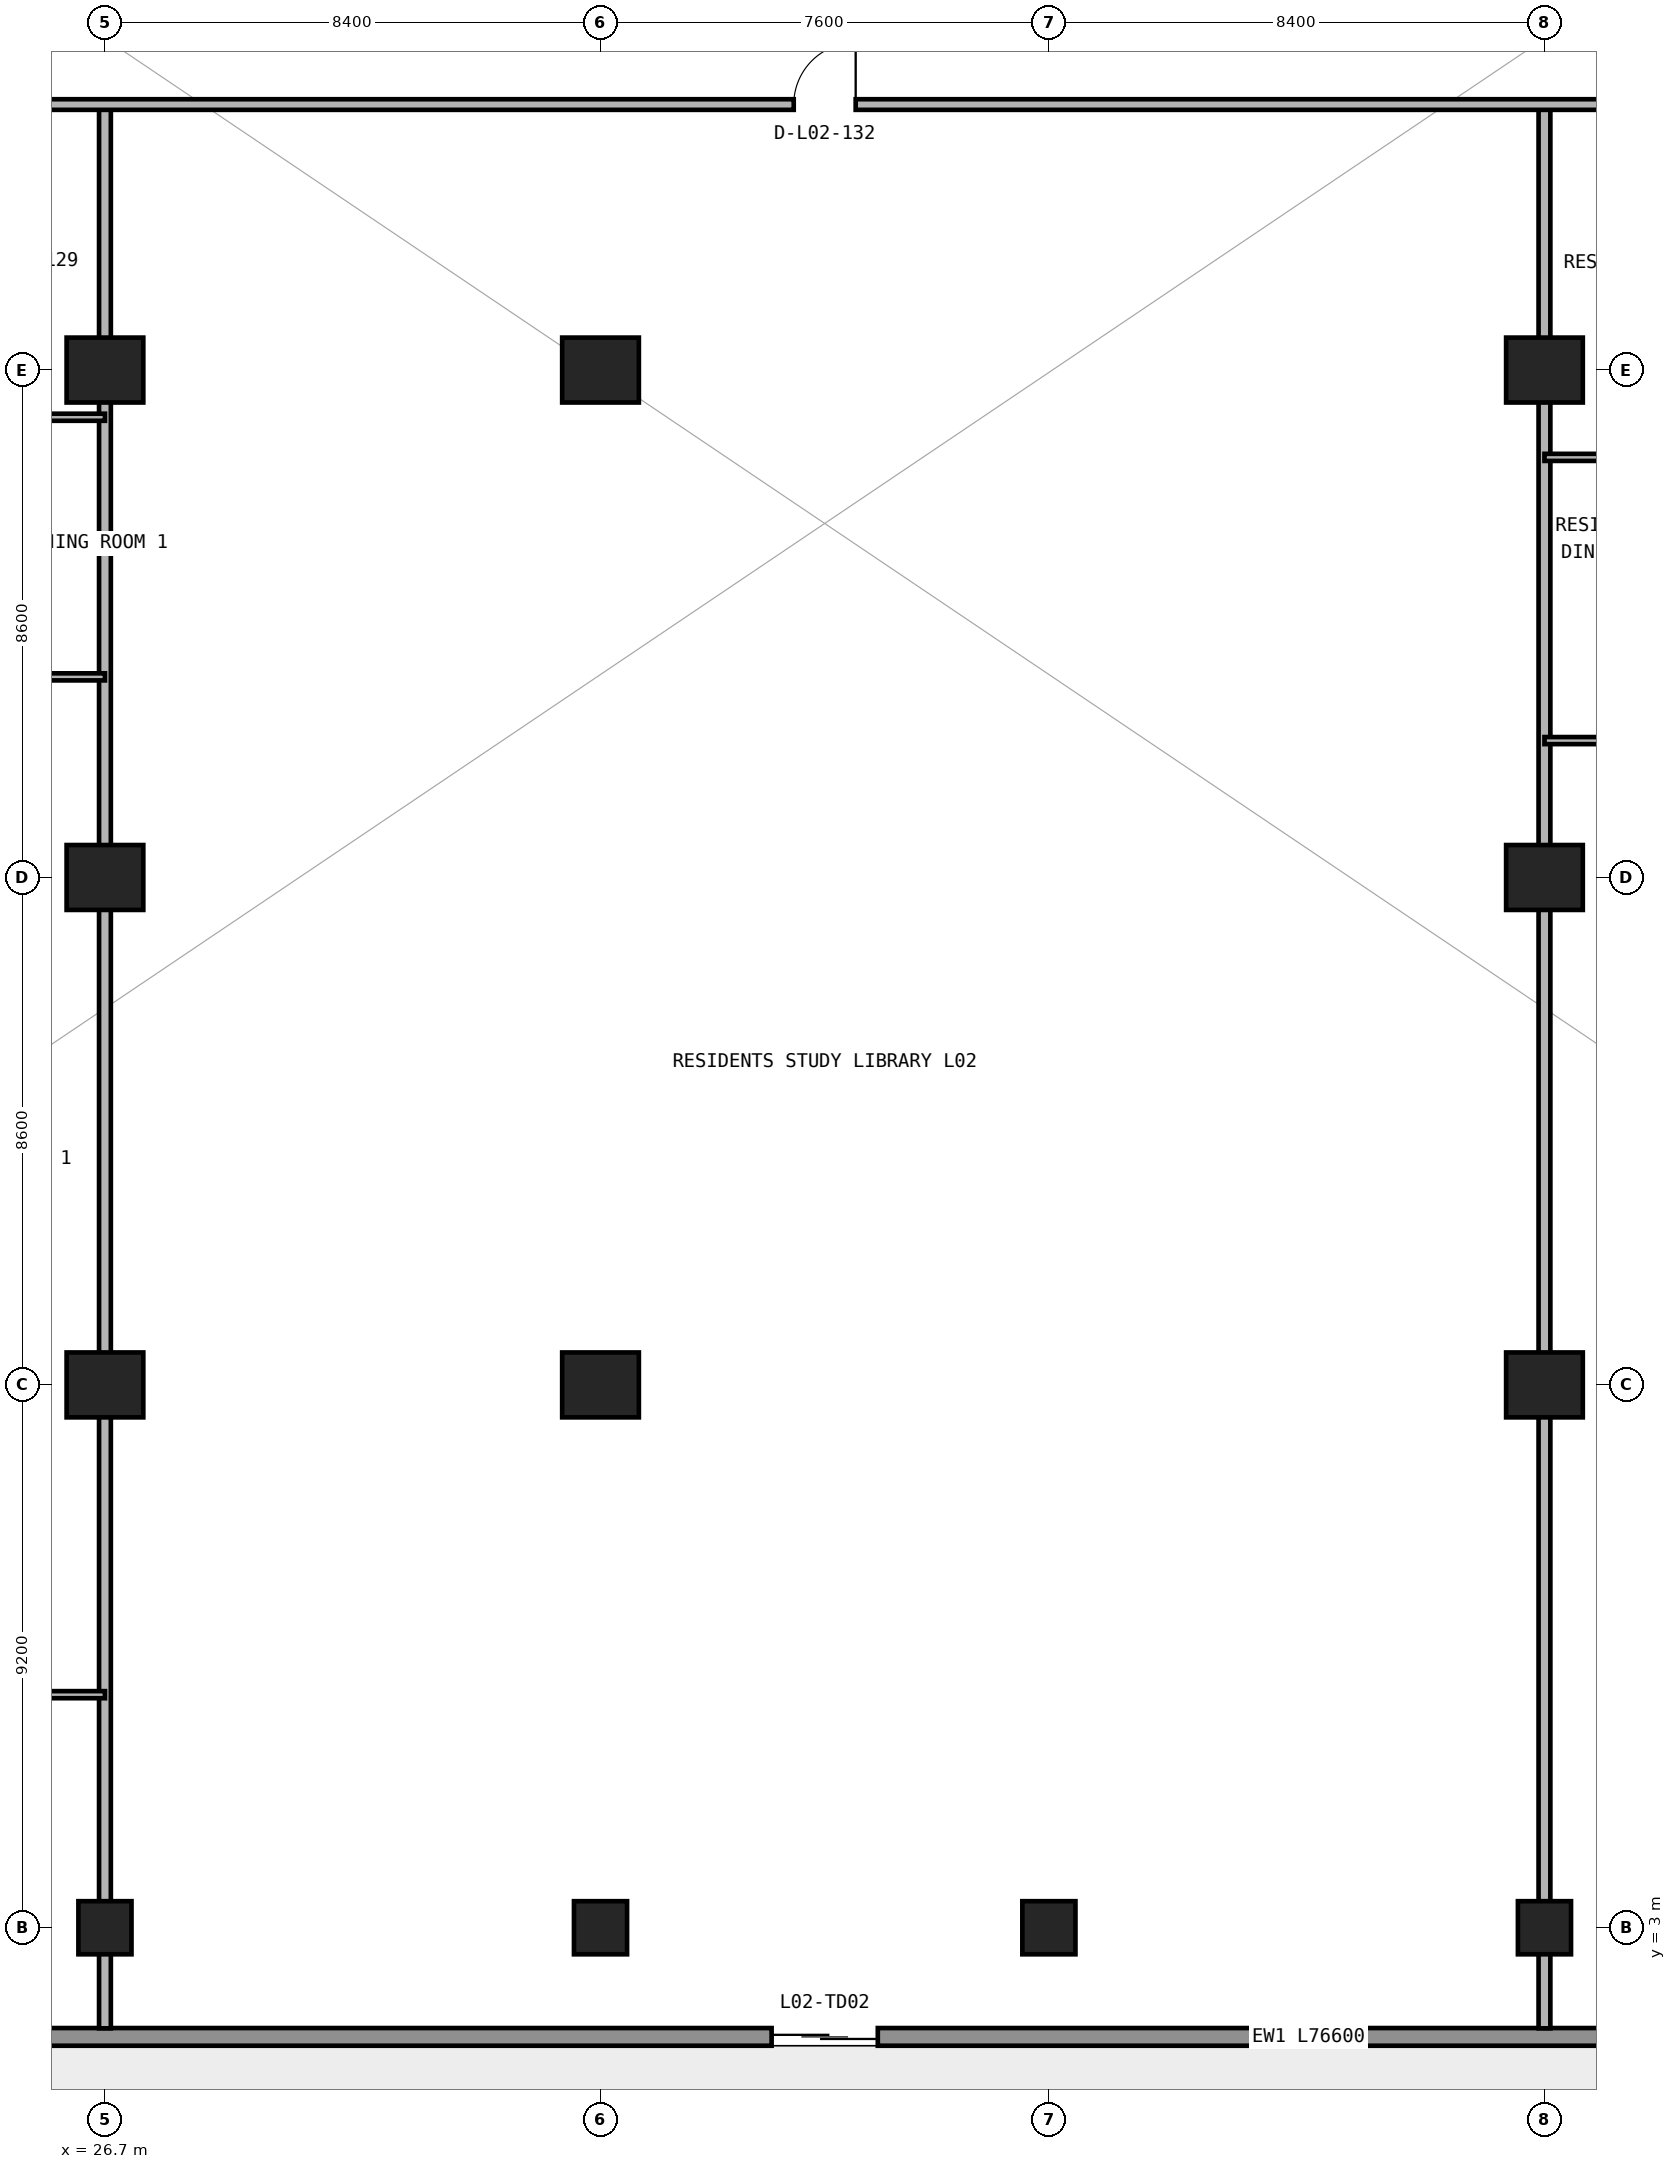
"""IFC4 building model, lengths in metres.
Left out: names, types, materials, properties, quantities, classifications, styles, units other than length and angle.
Written with IfcOpenShell. Run it as: python <this file> out.ifc"""

import sys

from ifc_helpers import new_model, si_unit, direction, frame, frame_2d, origin, origin_2d, place, context, subcontext, project, spatial, rectangle, circle, extrude, element, fill, save


model = new_model("IFC4")
c1 = context("Model", 3, precision=1e-05, world=origin(), true_north=direction((0.0, 1.0)))
c2 = subcontext(c1, "Body", "Model", "MODEL_VIEW")
j1 = project(units=[si_unit("LENGTHUNIT", "METRE"), si_unit("PLANEANGLEUNIT", "RADIAN")], contexts=[c1])
p1 = place(None, origin())
s1 = spatial("IfcSite", under=j1, at=p1, CompositionType="ELEMENT")
p2 = place(p1, origin())
s2 = spatial("IfcBuilding", under=s1, at=p2, CompositionType="ELEMENT")
p3 = place(p2, frame((0.0, 0.0, 10.2)))
s3 = spatial("IfcBuildingStorey", under=s2, at=p3, CompositionType="ELEMENT", Elevation=10.2)
for number, where, z_axis, x_axis in (
    (1, (26.7, 3.0, 0.0), (0.0, 0.0, 1.0), (1.0, 0.0, 0.0)),
    (2, (35.1, 3.0, 0.0), (0.0, 0.0, 1.0), (1.0, 0.0, 0.0)),
    (3, (42.7, 3.0, 0.0), (0.0, 0.0, 1.0), (1.0, 0.0, 0.0)),
    (4, (51.1, 3.0, 0.0), (0.0, 0.0, 1.0), (1.0, 0.0, 0.0)),
):
    element("IfcColumn", number, at=place(p3, frame(where, z_axis=z_axis, x_axis=x_axis)), inside=s3, PredefinedType="COLUMN", context=c2, shape_type="SweptSolid", body=[
        extrude(circle(Radius=0.45, at=origin_2d()), origin(), (0.0, 0.0, 1.0), 4.5),
    ])
for number, where, z_axis, x_axis in (
    (5, (26.7, 12.2, 0.0), (0.0, 0.0, 1.0), (1.0, 0.0, 0.0)),
    (6, (35.1, 12.2, 0.0), (0.0, 0.0, 1.0), (1.0, 0.0, 0.0)),
    (7, (51.1, 12.2, 0.0), (0.0, 0.0, 1.0), (1.0, 0.0, 0.0)),
    (8, (26.7, 20.8, 0.0), (0.0, 0.0, 1.0), (1.0, 0.0, 0.0)),
    (9, (51.1, 20.8, 0.0), (0.0, 0.0, 1.0), (1.0, 0.0, 0.0)),
    (10, (26.7, 29.4, 0.0), (0.0, 0.0, 1.0), (1.0, 0.0, 0.0)),
    (11, (35.1, 29.4, 0.0), (0.0, 0.0, 1.0), (1.0, 0.0, 0.0)),
    (12, (51.1, 29.4, 0.0), (0.0, 0.0, 1.0), (1.0, 0.0, 0.0)),
):
    element("IfcColumn", number, at=place(p3, frame(where, z_axis=z_axis, x_axis=x_axis)), inside=s3, PredefinedType="COLUMN", context=c2, shape_type="SweptSolid", body=[
        extrude(rectangle(XDim=1.3, YDim=1.1, at=origin_2d()), origin(), (0.0, 0.0, 1.0), 4.5),
    ])
p4 = place(p3, frame((77.2, 1.15, 0.0), z_axis=(0.0, 0.0, 1.0), x_axis=(-1.0, 0.0, 0.0)))
e13 = element("IfcWall", 13, at=p4, inside=s3, PredefinedType="STANDARD", context=c2, shape_type="SweptSolid", body=[
    extrude(rectangle(XDim=76.6, YDim=0.3, at=frame_2d((38.3, 0.0))), origin(), (0.0, 0.0, 1.0), 4.5),
])
p5 = place(p4, frame((70.375, 0.0, 0.85)))
e14 = element("IfcOpeningElement", 14, at=p5, cuts=e13, PredefinedType="OPENING", context=c2, shape_type="SweptSolid", body=[
    extrude(rectangle(XDim=3.0, YDim=2.4, at=frame_2d((1.5, 1.2))), frame((0.0, 0.16, 0.0), z_axis=(0.0, -1.0, 0.0), x_axis=(1.0, 0.0, 0.0)), (0.0, 0.0, 1.0), 0.32),
])
p6 = place(p4, frame((62.2, 0.0, 0.0)))
e15 = element("IfcOpeningElement", 15, at=p6, cuts=e13, PredefinedType="OPENING", context=c2, shape_type="SweptSolid", body=[
    extrude(rectangle(XDim=1.8, YDim=2.3, at=frame_2d((0.9, 1.15))), frame((0.0, 0.16, 0.0), z_axis=(0.0, -1.0, 0.0), x_axis=(1.0, 0.0, 0.0)), (0.0, 0.0, 1.0), 0.32),
])
p7 = place(p4, frame((53.6, 0.0, 0.85)))
e16 = element("IfcOpeningElement", 16, at=p7, cuts=e13, PredefinedType="OPENING", context=c2, shape_type="SweptSolid", body=[
    extrude(rectangle(XDim=2.2, YDim=1.55, at=frame_2d((1.1, 0.775))), frame((0.0, 0.16, 0.0), z_axis=(0.0, -1.0, 0.0), x_axis=(1.0, 0.0, 0.0)), (0.0, 0.0, 1.0), 0.32),
])
p8 = place(p4, frame((37.4, 0.0, 0.0)))
e17 = element("IfcOpeningElement", 17, at=p8, cuts=e13, PredefinedType="OPENING", context=c2, shape_type="SweptSolid", body=[
    extrude(rectangle(XDim=1.8, YDim=2.3, at=frame_2d((0.9, 1.15))), frame((0.0, 0.16, 0.0), z_axis=(0.0, -1.0, 0.0), x_axis=(1.0, 0.0, 0.0)), (0.0, 0.0, 1.0), 0.32),
])
p9 = place(p4, frame((21.0, 0.0, 0.0)))
e18 = element("IfcOpeningElement", 18, at=p9, cuts=e13, PredefinedType="OPENING", context=c2, shape_type="SweptSolid", body=[
    extrude(rectangle(XDim=1.8, YDim=2.3, at=frame_2d((0.9, 1.15))), frame((0.0, 0.16, 0.0), z_axis=(0.0, -1.0, 0.0), x_axis=(1.0, 0.0, 0.0)), (0.0, 0.0, 1.0), 0.32),
])
p10 = place(p4, frame((12.4, 0.0, 0.85)))
e19 = element("IfcOpeningElement", 19, at=p10, cuts=e13, PredefinedType="OPENING", context=c2, shape_type="SweptSolid", body=[
    extrude(rectangle(XDim=2.2, YDim=1.55, at=frame_2d((1.1, 0.775))), frame((0.0, 0.16, 0.0), z_axis=(0.0, -1.0, 0.0), x_axis=(1.0, 0.0, 0.0)), (0.0, 0.0, 1.0), 0.32),
])
p11 = place(p4, frame((3.825, 0.0, 0.0)))
e20 = element("IfcOpeningElement", 20, at=p11, cuts=e13, PredefinedType="OPENING", context=c2, shape_type="SweptSolid", body=[
    extrude(rectangle(XDim=1.8, YDim=2.3, at=frame_2d((0.9, 1.15))), frame((0.0, 0.16, 0.0), z_axis=(0.0, -1.0, 0.0), x_axis=(1.0, 0.0, 0.0)), (0.0, 0.0, 1.0), 0.32),
])
for number, where, z_axis, x_axis in (
    (21, (26.7, 1.295, 0.0), (0.0, 0.0, 1.0), (0.0, 1.0, 0.0)),
    (22, (51.1, 1.295, 0.0), (0.0, 0.0, 1.0), (0.0, 1.0, 0.0)),
):
    element("IfcWall", number, at=place(p3, frame(where, z_axis=z_axis, x_axis=x_axis)), inside=s3, PredefinedType="PARTITIONING", context=c2, shape_type="SweptSolid", body=[
        extrude(rectangle(XDim=32.605, YDim=0.2, at=frame_2d((16.302, 0.0))), origin(), (0.0, 0.0, 1.0), 3.464),
    ])
p12 = place(p3, frame((18.3, 6.95, 0.0), z_axis=(0.0, 0.0, 1.0), x_axis=(1.0, 0.0, 0.0)))
e23 = element("IfcWall", 23, at=p12, inside=s3, PredefinedType="PARTITIONING", context=c2, shape_type="SweptSolid", body=[
    extrude(rectangle(XDim=8.4, YDim=0.12, at=frame_2d((4.2, 0.0))), origin(), (0.0, 0.0, 1.0), 4.5),
])
p13 = place(p12, frame((3.75, 0.0, 0.0)))
e24 = element("IfcOpeningElement", 24, at=p13, cuts=e23, PredefinedType="OPENING", context=c2, shape_type="SweptSolid", body=[
    extrude(rectangle(XDim=0.9, YDim=2.15, at=frame_2d((0.45, 1.075))), frame((0.0, 0.07, 0.0), z_axis=(0.0, -1.0, 0.0), x_axis=(1.0, 0.0, 0.0)), (0.0, 0.0, 1.0), 0.14),
])
p14 = place(p3, frame((51.1, 23.12, 0.0), z_axis=(0.0, 0.0, 1.0), x_axis=(1.0, 0.0, 0.0)))
e25 = element("IfcWall", 25, at=p14, inside=s3, PredefinedType="PARTITIONING", context=c2, shape_type="SweptSolid", body=[
    extrude(rectangle(XDim=8.4, YDim=0.12, at=frame_2d((4.2, 0.0))), origin(), (0.0, 0.0, 1.0), 4.5),
])
p15 = place(p14, frame((1.314, 0.0, 0.0)))
e26 = element("IfcOpeningElement", 26, at=p15, cuts=e25, PredefinedType="OPENING", context=c2, shape_type="SweptSolid", body=[
    extrude(rectangle(XDim=0.9, YDim=2.15, at=frame_2d((0.45, 1.075))), frame((0.0, 0.07, 0.0), z_axis=(0.0, -1.0, 0.0), x_axis=(1.0, 0.0, 0.0)), (0.0, 0.0, 1.0), 0.14),
])
p16 = place(p3, frame((18.305, 24.2, 0.0), z_axis=(0.0, 0.0, 1.0), x_axis=(1.0, 0.0, 0.0)))
e27 = element("IfcWall", 27, at=p16, inside=s3, PredefinedType="PARTITIONING", context=c2, shape_type="SweptSolid", body=[
    extrude(rectangle(XDim=8.395, YDim=0.12, at=frame_2d((4.198, 0.0))), origin(), (0.0, 0.0, 1.0), 4.5),
])
p17 = place(p16, frame((3.748, 0.0, 0.0)))
e28 = element("IfcOpeningElement", 28, at=p17, cuts=e27, PredefinedType="OPENING", context=c2, shape_type="SweptSolid", body=[
    extrude(rectangle(XDim=0.9, YDim=2.15, at=frame_2d((0.45, 1.075))), frame((0.0, 0.07, 0.0), z_axis=(0.0, -1.0, 0.0), x_axis=(1.0, 0.0, 0.0)), (0.0, 0.0, 1.0), 0.14),
])
p18 = place(p3, frame((51.1, 27.92, 0.0), z_axis=(0.0, 0.0, 1.0), x_axis=(1.0, 0.0, 0.0)))
e29 = element("IfcWall", 29, at=p18, inside=s3, PredefinedType="PARTITIONING", context=c2, shape_type="SweptSolid", body=[
    extrude(rectangle(XDim=8.4, YDim=0.12, at=frame_2d((4.2, 0.0))), origin(), (0.0, 0.0, 1.0), 4.5),
])
p19 = place(p18, frame((1.314, 0.0, 0.0)))
e30 = element("IfcOpeningElement", 30, at=p19, cuts=e29, PredefinedType="OPENING", context=c2, shape_type="SweptSolid", body=[
    extrude(rectangle(XDim=0.9, YDim=2.15, at=frame_2d((0.45, 1.075))), frame((0.0, 0.07, 0.0), z_axis=(0.0, -1.0, 0.0), x_axis=(1.0, 0.0, 0.0)), (0.0, 0.0, 1.0), 0.14),
])
p20 = place(p3, frame((18.3, 28.6, 0.0), z_axis=(0.0, 0.0, 1.0), x_axis=(1.0, 0.0, 0.0)))
e31 = element("IfcWall", 31, at=p20, inside=s3, PredefinedType="PARTITIONING", context=c2, shape_type="SweptSolid", body=[
    extrude(rectangle(XDim=8.4, YDim=0.12, at=frame_2d((4.2, 0.0))), origin(), (0.0, 0.0, 1.0), 4.5),
])
p21 = place(p20, frame((2.844, 0.0, 0.0)))
e32 = element("IfcOpeningElement", 32, at=p21, cuts=e31, PredefinedType="OPENING", context=c2, shape_type="SweptSolid", body=[
    extrude(rectangle(XDim=0.9, YDim=2.15, at=frame_2d((0.45, 1.075))), frame((0.0, 0.07, 0.0), z_axis=(0.0, -1.0, 0.0), x_axis=(1.0, 0.0, 0.0)), (0.0, 0.0, 1.0), 0.14),
])
p22 = place(p3, frame((0.895, 33.9, 0.0), z_axis=(0.0, 0.0, 1.0), x_axis=(1.0, 0.0, 0.0)))
e33 = element("IfcWall", 33, at=p22, inside=s3, PredefinedType="PARTITIONING", context=c2, shape_type="SweptSolid", body=[
    extrude(rectangle(XDim=76.01, YDim=0.18, at=frame_2d((38.005, 0.0))), origin(), (0.0, 0.0, 1.0), 4.5),
])
p23 = place(p22, frame((3.978, 0.0, 0.0)))
e34 = element("IfcOpeningElement", 34, at=p23, cuts=e33, PredefinedType="OPENING", context=c2, shape_type="SweptSolid", body=[
    extrude(rectangle(XDim=1.05, YDim=2.15, at=frame_2d((0.525, 1.075))), frame((0.0, 0.1, 0.0), z_axis=(0.0, -1.0, 0.0), x_axis=(1.0, 0.0, 0.0)), (0.0, 0.0, 1.0), 0.2),
])
p24 = place(p22, frame((11.695, 0.0, 0.0)))
e35 = element("IfcOpeningElement", 35, at=p24, cuts=e33, PredefinedType="OPENING", context=c2, shape_type="SweptSolid", body=[
    extrude(rectangle(XDim=1.0, YDim=2.2, at=frame_2d((0.5, 1.1))), frame((0.0, 0.1, 0.0), z_axis=(0.0, -1.0, 0.0), x_axis=(1.0, 0.0, 0.0)), (0.0, 0.0, 1.0), 0.2),
])
p25 = place(p22, frame((37.48, 0.0, 0.0)))
e36 = element("IfcOpeningElement", 36, at=p25, cuts=e33, PredefinedType="OPENING", context=c2, shape_type="SweptSolid", body=[
    extrude(rectangle(XDim=1.05, YDim=2.15, at=frame_2d((0.525, 1.075))), frame((0.0, 0.1, 0.0), z_axis=(0.0, -1.0, 0.0), x_axis=(1.0, 0.0, 0.0)), (0.0, 0.0, 1.0), 0.2),
])
p26 = place(p22, frame((53.085, 0.0, 0.0)))
e37 = element("IfcOpeningElement", 37, at=p26, cuts=e33, PredefinedType="OPENING", context=c2, shape_type="SweptSolid", body=[
    extrude(rectangle(XDim=1.0, YDim=2.2, at=frame_2d((0.5, 1.1))), frame((0.0, 0.1, 0.0), z_axis=(0.0, -1.0, 0.0), x_axis=(1.0, 0.0, 0.0)), (0.0, 0.0, 1.0), 0.2),
])
p27 = place(p22, frame((70.982, 0.0, 0.0)))
e38 = element("IfcOpeningElement", 38, at=p27, cuts=e33, PredefinedType="OPENING", context=c2, shape_type="SweptSolid", body=[
    extrude(rectangle(XDim=1.05, YDim=2.15, at=frame_2d((0.525, 1.075))), frame((0.0, 0.1, 0.0), z_axis=(0.0, -1.0, 0.0), x_axis=(1.0, 0.0, 0.0)), (0.0, 0.0, 1.0), 0.2),
])
p28 = place(p8, origin())
e39 = element("IfcDoor", 39, at=p28, inside=s3, OperationType="DOUBLE_DOOR_SLIDING", PredefinedType="DOOR", context=c2, shape_type="SweptSolid", body=[
    extrude(rectangle(XDim=1.8, YDim=2.3, at=frame_2d((0.9, 1.15))), frame((0.0, 0.025, 0.0), z_axis=(0.0, -1.0, 0.0), x_axis=(1.0, 0.0, 0.0)), (0.0, 0.0, 1.0), 0.05),
])
fill(e17, e39)
p29 = place(p25, origin())
e40 = element("IfcDoor", 40, at=p29, inside=s3, OperationType="SINGLE_SWING_RIGHT", PredefinedType="DOOR", context=c2, shape_type="SweptSolid", body=[
    extrude(rectangle(XDim=1.05, YDim=2.15, at=frame_2d((0.525, 1.075))), frame((0.0, 0.025, 0.0), z_axis=(0.0, -1.0, 0.0), x_axis=(1.0, 0.0, 0.0)), (0.0, 0.0, 1.0), 0.05),
])
fill(e36, e40)
save(model, sys.argv[1])
